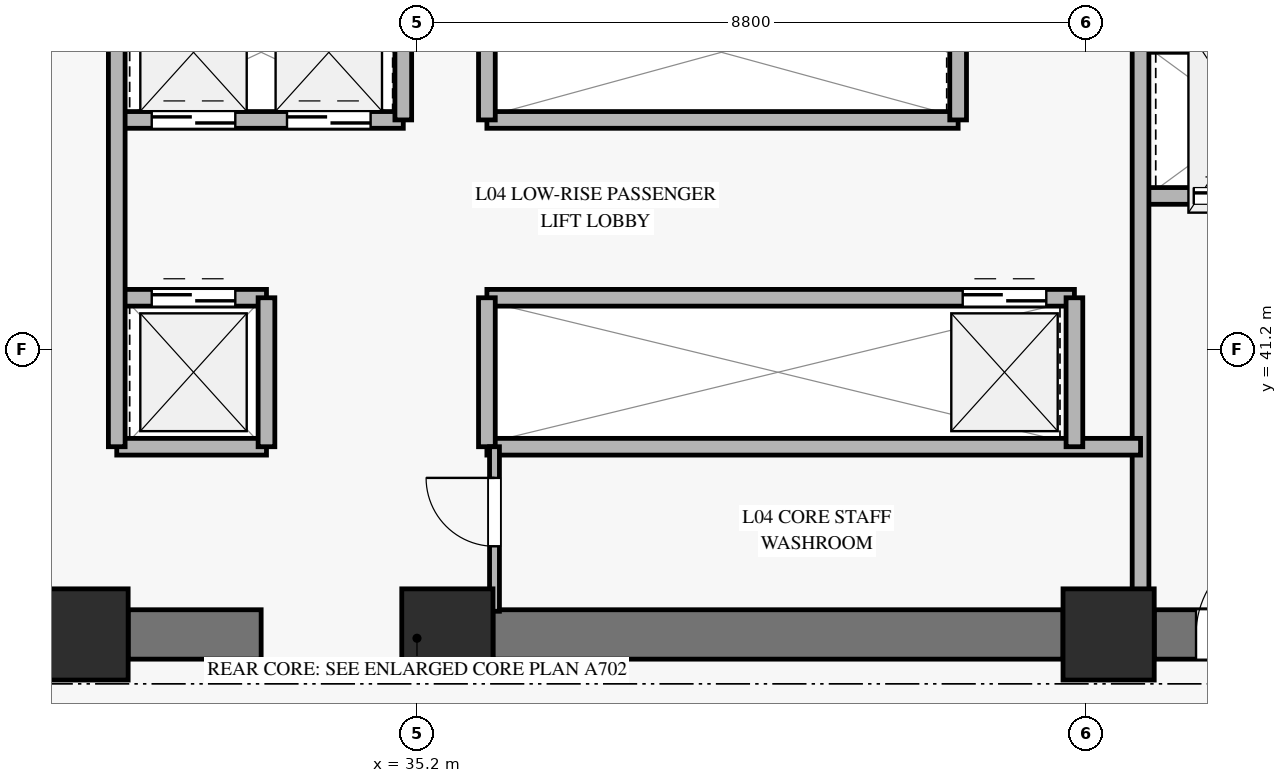
"""IFC4 building model, lengths in metres.
Left out: names, types, materials, properties, quantities, classifications, styles, units other than length and angle.
Written with IfcOpenShell. Run it as: python <this file> out.ifc"""

import sys

from ifc_helpers import new_model, si_unit, direction, frame, frame_2d, origin, origin_2d, place, context, subcontext, project, spatial, rectangle, extrude, source, transform, mapped, element, fill, save


model = new_model("IFC4")
c1 = context("Model", 3, precision=1e-05, world=origin(), true_north=direction((0.0, 1.0)))
c2 = subcontext(c1, "Body", "Model", "MODEL_VIEW")
j1 = project(units=[si_unit("LENGTHUNIT", "METRE"), si_unit("PLANEANGLEUNIT", "RADIAN")], contexts=[c1])
p1 = place(None, origin())
s1 = spatial("IfcSite", under=j1, at=p1, CompositionType="ELEMENT")
p2 = place(p1, origin())
s2 = spatial("IfcBuilding", under=s1, at=p2, CompositionType="ELEMENT")
p3 = place(p2, frame((0.0, 0.0, 15.2)))
s3 = spatial("IfcBuildingStorey", under=s2, at=p3, CompositionType="ELEMENT", Elevation=15.2)
m1 = source(origin(), c2, "Body", "SweptSolid", [
    extrude(rectangle(XDim=1.2, YDim=1.2, at=origin_2d()), origin(), (0.0, 0.0, 1.0), 4.65),
])
for number, where, z_axis, x_axis in (
    (1, (30.8, 37.45, 0.0), (0.0, 0.0, 1.0), (1.0, 0.0, 0.0)),
    (2, (35.6, 37.45, 0.0), (0.0, 0.0, 1.0), (1.0, 0.0, 0.0)),
    (3, (44.3, 37.45, 0.0), (0.0, 0.0, 1.0), (1.0, 0.0, 0.0)),
):
    element("IfcColumn", number, at=place(p3, frame(where, z_axis=z_axis, x_axis=x_axis)), inside=s3, PredefinedType="PILASTER", context=c2, shape_type="MappedRepresentation", body=[
        mapped(m1, transform((0.0, 0.0, 0.0), x_axis=(1.0, 0.0, 0.0), y_axis=(0.0, 1.0, 0.0), z_axis=(0.0, 0.0, 1.0), scale=1.0)),
    ])
p4 = place(p3, frame((31.4, 37.45, 0.0), z_axis=(0.0, 0.0, 1.0), x_axis=(1.0, 0.0, 0.0)))
e4 = element("IfcWall", 4, at=p4, inside=s3, PredefinedType="SHEAR", context=c2, shape_type="SweptSolid", body=[
    extrude(rectangle(XDim=1.75, YDim=0.65, at=frame_2d((0.875, 0.0))), origin(), (0.0, 0.0, 1.0), 4.65),
])
p5 = place(p3, frame((36.2, 37.45, 0.0), z_axis=(0.0, 0.0, 1.0), x_axis=(1.0, 0.0, 0.0)))
e5 = element("IfcWall", 5, at=p5, inside=s3, PredefinedType="SHEAR", context=c2, shape_type="SweptSolid", body=[
    extrude(rectangle(XDim=7.5, YDim=0.65, at=frame_2d((3.75, 0.0))), origin(), (0.0, 0.0, 1.0), 4.65),
])
p6 = place(p3, frame((44.9, 37.45, 0.0), z_axis=(0.0, 0.0, 1.0), x_axis=(1.0, 0.0, 0.0)))
e6 = element("IfcWall", 6, at=p6, inside=s3, PredefinedType="SHEAR", context=c2, shape_type="SweptSolid", body=[
    extrude(rectangle(XDim=5.05, YDim=0.65, at=frame_2d((2.525, 0.0))), origin(), (0.0, 0.0, 1.0), 4.65),
])
p7 = place(p6, frame((0.55, 0.0, 0.0)))
e7 = element("IfcOpeningElement", 7, at=p7, cuts=e6, PredefinedType="OPENING", context=c2, shape_type="SweptSolid", body=[
    extrude(rectangle(XDim=1.2, YDim=2.15, at=frame_2d((0.6, 1.075))), frame((0.0, 0.335, 0.0), z_axis=(0.0, -1.0, 0.0), x_axis=(1.0, 0.0, 0.0)), (0.0, 0.0, 1.0), 0.67),
])
p8 = place(p3, frame((44.72, 43.22, 0.0), z_axis=(0.0, 0.0, 1.0), x_axis=(1.0, 0.0, 0.0)))
e8 = element("IfcWall", 8, at=p8, inside=s3, PredefinedType="SOLIDWALL", context=c2, shape_type="SweptSolid", body=[
    extrude(rectangle(XDim=2.72, YDim=0.22, at=frame_2d((1.36, 0.0))), origin(), (0.0, 0.0, 1.0), 4.65),
])
p9 = place(p8, frame((0.7, 0.0, 0.0)))
e9 = element("IfcOpeningElement", 9, at=p9, cuts=e8, PredefinedType="OPENING", context=c2, shape_type="SweptSolid", body=[
    extrude(rectangle(XDim=1.1, YDim=2.2, at=frame_2d((0.55, 1.1))), frame((0.0, 0.12, 0.0), z_axis=(0.0, -1.0, 0.0), x_axis=(1.0, 0.0, 0.0)), (0.0, 0.0, 1.0), 0.24),
])
p10 = place(p3, frame((44.72, 45.22, 0.0), z_axis=(0.0, 0.0, 1.0), x_axis=(1.0, 0.0, 0.0)))
e10 = element("IfcWall", 10, at=p10, inside=s3, PredefinedType="SOLIDWALL", context=c2, shape_type="SweptSolid", body=[
    extrude(rectangle(XDim=2.72, YDim=0.22, at=frame_2d((1.36, 0.0))), origin(), (0.0, 0.0, 1.0), 4.65),
])
p11 = place(p3, frame((44.72, 37.755, 0.0), z_axis=(0.0, 0.0, 1.0), x_axis=(0.0, 1.0, 0.0)))
e11 = element("IfcWall", 11, at=p11, inside=s3, PredefinedType="SOLIDWALL", context=c2, shape_type="SweptSolid", body=[
    extrude(rectangle(XDim=7.465, YDim=0.22, at=frame_2d((3.732, 0.0))), origin(), (0.0, 0.0, 1.0), 4.65),
])
p12 = place(p3, frame((31.25, 44.22, 0.0), z_axis=(0.0, 0.0, 1.0), x_axis=(1.0, 0.0, 0.0)))
e12 = element("IfcWall", 12, at=p12, inside=s3, PredefinedType="SOLIDWALL", context=c2, shape_type="SweptSolid", body=[
    extrude(rectangle(XDim=3.77, YDim=0.22, at=frame_2d((1.885, 0.0))), origin(), (0.0, 0.0, 1.0), 4.65),
])
p13 = place(p12, frame((0.46, 0.0, 0.0)))
e13 = element("IfcOpeningElement", 13, at=p13, cuts=e12, PredefinedType="OPENING", context=c2, shape_type="SweptSolid", body=[
    extrude(rectangle(XDim=1.1, YDim=2.2, at=frame_2d((0.55, 1.1))), frame((0.0, 0.12, 0.0), z_axis=(0.0, -1.0, 0.0), x_axis=(1.0, 0.0, 0.0)), (0.0, 0.0, 1.0), 0.24),
])
p14 = place(p12, frame((2.24, 0.0, 0.0)))
e14 = element("IfcOpeningElement", 14, at=p14, cuts=e12, PredefinedType="OPENING", context=c2, shape_type="SweptSolid", body=[
    extrude(rectangle(XDim=1.1, YDim=2.2, at=frame_2d((0.55, 1.1))), frame((0.0, 0.12, 0.0), z_axis=(0.0, -1.0, 0.0), x_axis=(1.0, 0.0, 0.0)), (0.0, 0.0, 1.0), 0.24),
])
p15 = place(p3, frame((36.12, 44.22, 0.0), z_axis=(0.0, 0.0, 1.0), x_axis=(1.0, 0.0, 0.0)))
e15 = element("IfcWall", 15, at=p15, inside=s3, PredefinedType="SOLIDWALL", context=c2, shape_type="SweptSolid", body=[
    extrude(rectangle(XDim=6.2, YDim=0.22, at=frame_2d((3.1, 0.0))), origin(), (0.0, 0.0, 1.0), 4.65),
])
for number, where, z_axis, x_axis in (
    (16, (35.02, 44.22, 0.0), (0.0, 0.0, 1.0), (0.0, 1.0, 0.0)),
    (17, (36.12, 44.22, 0.0), (0.0, 0.0, 1.0), (0.0, 1.0, 0.0)),
    (18, (42.32, 44.22, 0.0), (0.0, 0.0, 1.0), (0.0, 1.0, 0.0)),
):
    element("IfcWall", number, at=place(p3, frame(where, z_axis=z_axis, x_axis=x_axis)), inside=s3, PredefinedType="SOLIDWALL", context=c2, shape_type="SweptSolid", body=[
        extrude(rectangle(XDim=2.025, YDim=0.22, at=frame_2d((1.013, 0.0))), origin(), (0.0, 0.0, 1.0), 4.65),
    ])
p16 = place(p3, frame((31.25, 41.88, 0.0), z_axis=(0.0, 0.0, 1.0), x_axis=(1.0, 0.0, 0.0)))
e19 = element("IfcWall", 19, at=p16, inside=s3, PredefinedType="SOLIDWALL", context=c2, shape_type="SweptSolid", body=[
    extrude(rectangle(XDim=1.97, YDim=0.22, at=frame_2d((0.985, 0.0))), origin(), (0.0, 0.0, 1.0), 4.65),
])
p17 = place(p16, frame((0.46, 0.0, 0.0)))
e20 = element("IfcOpeningElement", 20, at=p17, cuts=e19, PredefinedType="OPENING", context=c2, shape_type="SweptSolid", body=[
    extrude(rectangle(XDim=1.1, YDim=2.2, at=frame_2d((0.55, 1.1))), frame((0.0, 0.12, 0.0), z_axis=(0.0, -1.0, 0.0), x_axis=(1.0, 0.0, 0.0)), (0.0, 0.0, 1.0), 0.24),
])
p18 = place(p3, frame((36.12, 41.88, 0.0), z_axis=(0.0, 0.0, 1.0), x_axis=(1.0, 0.0, 0.0)))
e21 = element("IfcWall", 21, at=p18, inside=s3, PredefinedType="SOLIDWALL", context=c2, shape_type="SweptSolid", body=[
    extrude(rectangle(XDim=7.73, YDim=0.22, at=frame_2d((3.865, 0.0))), origin(), (0.0, 0.0, 1.0), 4.65),
])
p19 = place(p18, frame((6.26, 0.0, 0.0)))
e22 = element("IfcOpeningElement", 22, at=p19, cuts=e21, PredefinedType="OPENING", context=c2, shape_type="SweptSolid", body=[
    extrude(rectangle(XDim=1.1, YDim=2.2, at=frame_2d((0.55, 1.1))), frame((0.0, 0.12, 0.0), z_axis=(0.0, -1.0, 0.0), x_axis=(1.0, 0.0, 0.0)), (0.0, 0.0, 1.0), 0.24),
])
p20 = place(p3, frame((31.25, 39.92, 0.0), z_axis=(0.0, 0.0, 1.0), x_axis=(1.0, 0.0, 0.0)))
e23 = element("IfcWall", 23, at=p20, inside=s3, PredefinedType="SOLIDWALL", context=c2, shape_type="SweptSolid", body=[
    extrude(rectangle(XDim=1.97, YDim=0.22, at=frame_2d((0.985, 0.0))), origin(), (0.0, 0.0, 1.0), 4.65),
])
p21 = place(p3, frame((33.22, 39.92, 0.0), z_axis=(0.0, 0.0, 1.0), x_axis=(0.0, 1.0, 0.0)))
e24 = element("IfcWall", 24, at=p21, inside=s3, PredefinedType="SOLIDWALL", context=c2, shape_type="SweptSolid", body=[
    extrude(rectangle(XDim=1.96, YDim=0.22, at=frame_2d((0.98, 0.0))), origin(), (0.0, 0.0, 1.0), 4.65),
])
p22 = place(p3, frame((36.12, 39.92, 0.0), z_axis=(0.0, 0.0, 1.0), x_axis=(1.0, 0.0, 0.0)))
e25 = element("IfcWall", 25, at=p22, inside=s3, PredefinedType="SOLIDWALL", context=c2, shape_type="SweptSolid", body=[
    extrude(rectangle(XDim=8.6, YDim=0.22, at=frame_2d((4.3, 0.0))), origin(), (0.0, 0.0, 1.0), 3.935),
])
p23 = place(p3, frame((36.12, 39.92, 0.0), z_axis=(0.0, 0.0, 1.0), x_axis=(0.0, 1.0, 0.0)))
e26 = element("IfcWall", 26, at=p23, inside=s3, PredefinedType="SOLIDWALL", context=c2, shape_type="SweptSolid", body=[
    extrude(rectangle(XDim=1.96, YDim=0.22, at=frame_2d((0.98, 0.0))), origin(), (0.0, 0.0, 1.0), 4.65),
])
p24 = place(p3, frame((31.25, 39.92, 0.0), z_axis=(0.0, 0.0, 1.0), x_axis=(0.0, 1.0, 0.0)))
e27 = element("IfcWall", 27, at=p24, inside=s3, PredefinedType="SOLIDWALL", context=c2, shape_type="SweptSolid", body=[
    extrude(rectangle(XDim=6.325, YDim=0.22, at=frame_2d((3.163, 0.0))), origin(), (0.0, 0.0, 1.0), 4.65),
])
p25 = place(p3, frame((43.85, 39.92, 0.0), z_axis=(0.0, 0.0, 1.0), x_axis=(0.0, 1.0, 0.0)))
e28 = element("IfcWall", 28, at=p25, inside=s3, PredefinedType="SOLIDWALL", context=c2, shape_type="SweptSolid", body=[
    extrude(rectangle(XDim=1.96, YDim=0.22, at=frame_2d((0.98, 0.0))), origin(), (0.0, 0.0, 1.0), 4.65),
])
p26 = place(p3, frame((36.22, 37.755, 0.0), z_axis=(0.0, 0.0, 1.0), x_axis=(0.0, 1.0, 0.0)))
e29 = element("IfcWall", 29, at=p26, inside=s3, PredefinedType="PARTITIONING", context=c2, shape_type="SweptSolid", body=[
    extrude(rectangle(XDim=2.165, YDim=0.13, at=frame_2d((1.083, 0.0))), origin(), (0.0, 0.0, 1.0), 4.65),
])
p27 = place(p26, frame((0.855, 0.0, 0.0)))
e30 = element("IfcOpeningElement", 30, at=p27, cuts=e29, PredefinedType="OPENING", context=c2, shape_type="SweptSolid", body=[
    extrude(rectangle(XDim=0.9, YDim=2.1, at=frame_2d((0.45, 1.05))), frame((0.0, 0.075, 0.0), z_axis=(0.0, -1.0, 0.0), x_axis=(1.0, 0.0, 0.0)), (0.0, 0.0, 1.0), 0.15),
])
m2 = source(origin(), c2, "Body", "SweptSolid", [
    extrude(rectangle(XDim=1.1, YDim=2.2, at=frame_2d((0.55, 1.1))), frame((0.0, 0.025, 0.0), z_axis=(0.0, -1.0, 0.0), x_axis=(1.0, 0.0, 0.0)), (0.0, 0.0, 1.0), 0.05),
])
p28 = place(p9, origin())
e31 = element("IfcDoor", 31, at=p28, inside=s3, OperationType="SLIDING_TO_LEFT", PredefinedType="DOOR", context=c2, shape_type="MappedRepresentation", body=[
    mapped(m2, transform((0.0, 0.0, 0.0), x_axis=(1.0, 0.0, 0.0), y_axis=(0.0, 1.0, 0.0), z_axis=(0.0, 0.0, 1.0), scale=1.0)),
])
fill(e9, e31)
m3 = source(origin(), c2, "Body", "SweptSolid", [
    extrude(rectangle(XDim=1.2, YDim=2.15, at=frame_2d((0.6, 1.075))), frame((0.0, 0.025, 0.0), z_axis=(0.0, -1.0, 0.0), x_axis=(1.0, 0.0, 0.0)), (0.0, 0.0, 1.0), 0.05),
])
p29 = place(p7, origin())
e32 = element("IfcDoor", 32, at=p29, inside=s3, OperationType="SINGLE_SWING_RIGHT", PredefinedType="DOOR", context=c2, shape_type="MappedRepresentation", body=[
    mapped(m3, transform((0.0, 0.0, 0.0), x_axis=(1.0, 0.0, 0.0), y_axis=(0.0, 1.0, 0.0), z_axis=(0.0, 0.0, 1.0), scale=1.0)),
])
fill(e7, e32)
p30 = place(p13, origin())
e33 = element("IfcDoor", 33, at=p30, inside=s3, OperationType="SLIDING_TO_LEFT", PredefinedType="DOOR", context=c2, shape_type="MappedRepresentation", body=[
    mapped(m2, transform((0.0, 0.0, 0.0), x_axis=(1.0, 0.0, 0.0), y_axis=(0.0, 1.0, 0.0), z_axis=(0.0, 0.0, 1.0), scale=1.0)),
])
fill(e13, e33)
p31 = place(p14, origin())
e34 = element("IfcDoor", 34, at=p31, inside=s3, OperationType="SLIDING_TO_LEFT", PredefinedType="DOOR", context=c2, shape_type="MappedRepresentation", body=[
    mapped(m2, transform((0.0, 0.0, 0.0), x_axis=(1.0, 0.0, 0.0), y_axis=(0.0, 1.0, 0.0), z_axis=(0.0, 0.0, 1.0), scale=1.0)),
])
fill(e14, e34)
p32 = place(p17, origin())
e35 = element("IfcDoor", 35, at=p32, inside=s3, OperationType="SLIDING_TO_LEFT", PredefinedType="DOOR", context=c2, shape_type="MappedRepresentation", body=[
    mapped(m2, transform((0.0, 0.0, 0.0), x_axis=(1.0, 0.0, 0.0), y_axis=(0.0, 1.0, 0.0), z_axis=(0.0, 0.0, 1.0), scale=1.0)),
])
fill(e20, e35)
p33 = place(p19, origin())
e36 = element("IfcDoor", 36, at=p33, inside=s3, OperationType="SLIDING_TO_LEFT", PredefinedType="DOOR", context=c2, shape_type="MappedRepresentation", body=[
    mapped(m2, transform((0.0, 0.0, 0.0), x_axis=(1.0, 0.0, 0.0), y_axis=(0.0, 1.0, 0.0), z_axis=(0.0, 0.0, 1.0), scale=1.0)),
])
fill(e22, e36)
m4 = source(origin(), c2, "Body", "SweptSolid", [
    extrude(rectangle(XDim=0.9, YDim=2.1, at=frame_2d((0.45, 1.05))), frame((0.0, 0.025, 0.0), z_axis=(0.0, -1.0, 0.0), x_axis=(1.0, 0.0, 0.0)), (0.0, 0.0, 1.0), 0.05),
])
p34 = place(p27, origin())
e37 = element("IfcDoor", 37, at=p34, inside=s3, OperationType="SINGLE_SWING_RIGHT", PredefinedType="DOOR", context=c2, shape_type="MappedRepresentation", body=[
    mapped(m4, transform((0.0, 0.0, 0.0), x_axis=(1.0, 0.0, 0.0), y_axis=(0.0, 1.0, 0.0), z_axis=(0.0, 0.0, 1.0), scale=1.0)),
])
fill(e30, e37)
save(model, sys.argv[1])
